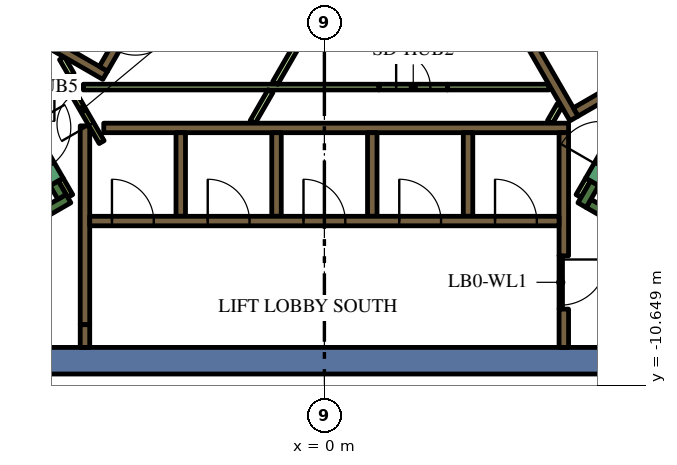
"""IFC4 building model, lengths in metres.
Left out: names, types, materials, properties, quantities, classifications, styles, units other than length and angle.
Written with IfcOpenShell. Run it as: python <this file> out.ifc"""

import sys

from ifc_helpers import new_model, si_unit, direction, frame, frame_2d, origin, place, context, subcontext, project, spatial, polyline, rectangle, outline, extrude, element, fill, save


model = new_model("IFC4")
c1 = context("Model", 3, precision=1e-05, world=origin(), true_north=direction((0.0, 1.0)))
c2 = subcontext(c1, "Body", "Model", "MODEL_VIEW")
j1 = project(units=[si_unit("LENGTHUNIT", "METRE"), si_unit("PLANEANGLEUNIT", "RADIAN")], contexts=[c1])
p1 = place(None, origin())
s1 = spatial("IfcSite", under=j1, at=p1, CompositionType="ELEMENT")
p2 = place(p1, origin())
s2 = spatial("IfcBuilding", under=s1, at=p2, CompositionType="ELEMENT")
p3 = place(p2, frame((0.0, 0.0, 214.2)))
s3 = spatial("IfcBuildingStorey", under=s2, at=p3, CompositionType="ELEMENT", Elevation=214.2)
p4 = place(p3, frame((-10.556, -10.0, 0.0), z_axis=(0.0, 0.0, 1.0), x_axis=(1.0, 0.0, 0.0)))
e1 = element("IfcWall", 1, at=p4, inside=s3, PredefinedType="SOLIDWALL", context=c2, shape_type="SweptSolid", body=[
    extrude(rectangle(XDim=19.461, YDim=0.7, at=frame_2d((9.73, 0.0))), origin(), (0.0, 0.0, 1.0), 4.2),
])
p5 = place(p3, frame((12.84, -9.261, 0.0), z_axis=(0.0, 0.0, 1.0), x_axis=(-0.866013990052, 0.500019768644, 0.0)))
e2 = element("IfcWall", 2, at=p5, inside=s3, PredefinedType="SOLIDWALL", context=c2, shape_type="SweptSolid", body=[
    extrude(rectangle(XDim=6.8, YDim=0.25, at=frame_2d((3.4, 0.0))), origin(), (0.0, 0.0, 1.0), 4.2),
])
p6 = place(p3, frame((7.113, -5.33, 0.0), z_axis=(0.0, 0.0, 1.0), x_axis=(-0.499965889992, -0.866045096311, 0.0)))
e3 = element("IfcWall", 3, at=p6, inside=s3, PredefinedType="SOLIDWALL", context=c2, shape_type="SweptSolid", body=[
    extrude(rectangle(XDim=0.666, YDim=0.25, at=frame_2d((0.333, 0.0))), origin(), (0.0, 0.0, 1.0), 4.2),
])
p7 = place(p3, frame((-12.84, -9.261, 0.0), z_axis=(0.0, 0.0, 1.0), x_axis=(0.866016039709, 0.500016218704, 0.0)))
e4 = element("IfcWall", 4, at=p7, inside=s3, PredefinedType="SOLIDWALL", context=c2, shape_type="SweptSolid", body=[
    extrude(rectangle(XDim=7.05, YDim=0.25, at=frame_2d((3.525, 0.0))), origin(), (0.0, 0.0, 1.0), 4.2),
])
p8 = place(p3, frame((-6.905, -5.69, 0.0), z_axis=(0.0, 0.0, 1.0), x_axis=(-0.499993700073, 0.866029041019, 0.0)))
e5 = element("IfcWall", 5, at=p8, inside=s3, PredefinedType="SOLIDWALL", context=c2, shape_type="SweptSolid", body=[
    extrude(rectangle(XDim=0.416, YDim=0.25, at=frame_2d((0.208, 0.0))), origin(), (0.0, 0.0, 1.0), 4.2),
])
p9 = place(p3, frame((-6.3, -9.05, 0.0), z_axis=(0.0, 0.0, 1.0), x_axis=(0.0, 1.0, 0.0)))
e6 = element("IfcWall", 6, at=p9, inside=s3, PredefinedType="SOLIDWALL", context=c2, shape_type="SweptSolid", body=[
    extrude(rectangle(XDim=5.23, YDim=0.25, at=frame_2d((2.615, 0.0))), origin(), (0.0, 0.0, 1.0), 4.2),
])
p10 = place(p3, frame((-6.3, -9.052, 0.0), z_axis=(0.0, 0.0, 1.0), x_axis=(0.0, -1.0, 0.0)))
e7 = element("IfcWall", 7, at=p10, inside=s3, PredefinedType="SOLIDWALL", context=c2, shape_type="SweptSolid", body=[
    extrude(rectangle(XDim=0.598, YDim=0.25, at=frame_2d((0.299, 0.0))), origin(), (0.0, 0.0, 1.0), 4.2),
])
p11 = place(p3, frame((-5.806, -3.875, 0.0), z_axis=(0.0, 0.0, 1.0), x_axis=(1.0, 0.0, 0.0)))
e8 = element("IfcWall", 8, at=p11, inside=s3, PredefinedType="SOLIDWALL", context=c2, shape_type="SweptSolid", body=[
    extrude(rectangle(XDim=12.231, YDim=0.25, at=frame_2d((6.116, 0.0))), origin(), (0.0, 0.0, 1.0), 4.2),
])
p12 = place(p3, frame((6.3, -7.24, 0.0), z_axis=(0.0, 0.0, 1.0), x_axis=(0.0, 1.0, 0.0)))
e9 = element("IfcWall", 9, at=p12, inside=s3, PredefinedType="SOLIDWALL", context=c2, shape_type="SweptSolid", body=[
    extrude(rectangle(XDim=3.24, YDim=0.25, at=frame_2d((1.62, 0.0))), origin(), (0.0, 0.0, 1.0), 4.2),
])
p13 = place(p3, frame((6.3, -9.65, 0.0), z_axis=(0.0, 0.0, 1.0), x_axis=(0.0, 1.0, 0.0)))
e10 = element("IfcWall", 10, at=p13, inside=s3, PredefinedType="SOLIDWALL", context=c2, shape_type="SweptSolid", body=[
    extrude(rectangle(XDim=1.008, YDim=0.25, at=frame_2d((0.504, 0.0))), origin(), (0.0, 0.0, 1.0), 4.2),
])
for number, where, z_axis, x_axis in (
    (11, (3.78, -4.0, 0.0), (0.0, 0.0, 1.0), (0.0, -1.0, 0.0)),
    (12, (1.26, -4.0, 0.0), (0.0, 0.0, 1.0), (0.0, -1.0, 0.0)),
    (13, (-1.26, -4.0, 0.0), (0.0, 0.0, 1.0), (0.0, -1.0, 0.0)),
    (14, (-3.78, -4.0, 0.0), (0.0, 0.0, 1.0), (0.0, -1.0, 0.0)),
):
    element("IfcWall", number, at=place(p3, frame(where, z_axis=z_axis, x_axis=x_axis)), inside=s3, PredefinedType="SOLIDWALL", context=c2, shape_type="SweptSolid", body=[
        extrude(rectangle(XDim=2.2, YDim=0.25, at=frame_2d((1.1, 0.0))), origin(), (0.0, 0.0, 1.0), 4.2),
    ])
p14 = place(p3, origin())
e15 = element("IfcWall", 15, at=p14, inside=s3, PredefinedType="SOLIDWALL", context=c2, shape_type="SweptSolid", body=[
    extrude(outline(polyline([(0.332, 6.925), (0.335, 6.925), (0.335, 6.925), (0.335, 6.925), (0.335, 7.075), (0.335, 7.075), (0.335, 7.075), (0.245, 7.075), (0.035, 7.439), (0.252, 7.564), (0.377, 7.348), (1.512, 5.382), (1.637, 5.165), (2.221, 4.153), (2.771, 3.199), (2.896, 2.983), (3.138, 2.564), (4.031, 1.017), (4.156, 0.801), (5.292, -1.165), (5.417, -1.382), (6.073, -2.519), (6.552, -3.348), (6.677, -3.564), (6.46, -3.689), (0.332, 6.925)])), origin(), (0.0, 0.0, 1.0), 4.2),
])
p15 = place(p3, frame((11.507, -0.631, 0.0), z_axis=(0.0, 0.0, 1.0), x_axis=(-0.866011447264, -0.500024172624, 0.0)))
e16 = element("IfcWall", 16, at=p15, inside=s3, PredefinedType="SOLIDWALL", context=c2, shape_type="SweptSolid", body=[
    extrude(rectangle(XDim=5.65, YDim=0.25, at=frame_2d((2.825, 0.0))), origin(), (0.0, 0.0, 1.0), 4.2),
])
p16 = place(p3, frame((-7.889, -1.265, 0.0), z_axis=(0.0, 0.0, 1.0), x_axis=(0.866057815567, -0.499943856944, 0.0)))
e17 = element("IfcWall", 17, at=p16, inside=s3, PredefinedType="SOLIDWALL", context=c2, shape_type="SweptSolid", body=[
    extrude(rectangle(XDim=2.45, YDim=0.25, at=frame_2d((1.225, 0.0))), origin(), (0.0, 0.0, 1.0), 4.2),
])
p17 = place(p3, frame((1.438, -2.8, 0.0), z_axis=(0.0, 0.0, 1.0), x_axis=(-1.0, 0.0, 0.0)))
e18 = element("IfcWall", 18, at=p17, inside=s3, PredefinedType="PARTITIONING", context=c2, shape_type="SweptSolid", body=[
    extrude(rectangle(XDim=7.781, YDim=0.15, at=frame_2d((3.891, 0.0))), origin(), (0.0, 0.0, 1.0), 3.45),
])
p18 = place(p3, frame((-1.418, -2.907, 0.0), z_axis=(0.0, 0.0, 1.0), x_axis=(-0.499978056798, -0.866038072327, 0.0)))
e19 = element("IfcWall", 19, at=p18, inside=s3, PredefinedType="PARTITIONING", context=c2, shape_type="SweptSolid", body=[
    extrude(rectangle(XDim=0.937, YDim=0.15, at=frame_2d((0.469, 0.0))), origin(), (0.0, 0.0, 1.0), 3.45),
])
for number, where, z_axis, x_axis in (
    (20, (-1.295, -2.693, 0.0), (0.0, 0.0, 1.0), (0.5, 0.866, 0.0)),
    (21, (3.238, -2.8, 0.0), (0.0, 0.0, 1.0), (1.0, 0.0, 0.0)),
):
    element("IfcWall", number, at=place(p3, frame(where, z_axis=z_axis, x_axis=x_axis)), inside=s3, PredefinedType="PARTITIONING", context=c2, shape_type="SweptSolid", body=[
        extrude(rectangle(XDim=2.672, YDim=0.15, at=frame_2d((1.336, 0.0))), origin(), (0.0, 0.0, 1.0), 3.45),
    ])
p19 = place(p3, frame((-6.653, -2.477, 0.0), z_axis=(0.0, 0.0, 1.0), x_axis=(-0.500002592159, 0.866023907196, 0.0)))
e22 = element("IfcWall", 22, at=p19, inside=s3, PredefinedType="PARTITIONING", context=c2, shape_type="SweptSolid", body=[
    extrude(rectangle(XDim=0.503, YDim=0.15, at=frame_2d((0.251, 0.0))), origin(), (0.0, 0.0, 1.0), 3.45),
])
p20 = place(p3, frame((-6.94, -5.23, 0.0), z_axis=(0.0, 0.0, 1.0), x_axis=(0.499834152157, -0.86612113491, 0.0)))
e23 = element("IfcWall", 23, at=p20, inside=s3, PredefinedType="PARTITIONING", context=c2, shape_type="SweptSolid", body=[
    extrude(rectangle(XDim=0.505, YDim=0.15, at=frame_2d((0.252, 0.0))), origin(), (0.0, 0.0, 1.0), 4.2),
])
p21 = place(p3, frame((6.688, -5.667, 0.0), z_axis=(0.0, 0.0, 1.0), x_axis=(0.499834152157, 0.86612113491, 0.0)))
e24 = element("IfcWall", 24, at=p21, inside=s3, PredefinedType="PARTITIONING", context=c2, shape_type="SweptSolid", body=[
    extrude(rectangle(XDim=0.505, YDim=0.15, at=frame_2d((0.252, 0.0))), origin(), (0.0, 0.0, 1.0), 3.45),
])
p22 = place(p3, frame((5.936, -3.718, 0.0), z_axis=(0.0, 0.0, 1.0), x_axis=(0.499890179513, 0.866088799389, 0.0)))
e25 = element("IfcWall", 25, at=p22, inside=s3, PredefinedType="PARTITIONING", context=c2, shape_type="SweptSolid", body=[
    extrude(rectangle(XDim=0.504, YDim=0.15, at=frame_2d((0.252, 0.0))), origin(), (0.0, 0.0, 1.0), 3.45),
])
p23 = place(p3, frame((-6.175, -6.325, 0.0), z_axis=(0.0, 0.0, 1.0), x_axis=(1.0, 0.0, 0.0)))
e26 = element("IfcWall", 26, at=p23, inside=s3, PredefinedType="SOLIDWALL", context=c2, shape_type="SweptSolid", body=[
    extrude(rectangle(XDim=12.35, YDim=0.25, at=frame_2d((6.175, 0.0))), origin(), (0.0, 0.0, 1.0), 4.2),
])
p24 = place(p23, frame((0.585, 0.0, 0.0)))
e27 = element("IfcOpeningElement", 27, at=p24, cuts=e26, PredefinedType="OPENING", context=c2, shape_type="SweptSolid", body=[
    extrude(rectangle(XDim=1.1, YDim=2.1, at=frame_2d((0.55, 1.05))), frame((0.0, 0.135, 0.0), z_axis=(0.0, -1.0, 0.0), x_axis=(1.0, 0.0, 0.0)), (0.0, 0.0, 1.0), 0.27),
])
p25 = place(p23, frame((3.105, 0.0, 0.0)))
e28 = element("IfcOpeningElement", 28, at=p25, cuts=e26, PredefinedType="OPENING", context=c2, shape_type="SweptSolid", body=[
    extrude(rectangle(XDim=1.1, YDim=2.1, at=frame_2d((0.55, 1.05))), frame((0.0, 0.135, 0.0), z_axis=(0.0, -1.0, 0.0), x_axis=(1.0, 0.0, 0.0)), (0.0, 0.0, 1.0), 0.27),
])
p26 = place(p23, frame((5.625, 0.0, 0.0)))
e29 = element("IfcOpeningElement", 29, at=p26, cuts=e26, PredefinedType="OPENING", context=c2, shape_type="SweptSolid", body=[
    extrude(rectangle(XDim=1.1, YDim=2.1, at=frame_2d((0.55, 1.05))), frame((0.0, 0.135, 0.0), z_axis=(0.0, -1.0, 0.0), x_axis=(1.0, 0.0, 0.0)), (0.0, 0.0, 1.0), 0.27),
])
p27 = place(p23, frame((8.145, 0.0, 0.0)))
e30 = element("IfcOpeningElement", 30, at=p27, cuts=e26, PredefinedType="OPENING", context=c2, shape_type="SweptSolid", body=[
    extrude(rectangle(XDim=1.1, YDim=2.1, at=frame_2d((0.55, 1.05))), frame((0.0, 0.135, 0.0), z_axis=(0.0, -1.0, 0.0), x_axis=(1.0, 0.0, 0.0)), (0.0, 0.0, 1.0), 0.27),
])
p28 = place(p23, frame((10.665, 0.0, 0.0)))
e31 = element("IfcOpeningElement", 31, at=p28, cuts=e26, PredefinedType="OPENING", context=c2, shape_type="SweptSolid", body=[
    extrude(rectangle(XDim=1.1, YDim=2.1, at=frame_2d((0.55, 1.05))), frame((0.0, 0.135, 0.0), z_axis=(0.0, -1.0, 0.0), x_axis=(1.0, 0.0, 0.0)), (0.0, 0.0, 1.0), 0.27),
])
p29 = place(p3, frame((8.565, -2.185, 0.0), z_axis=(0.0, 0.0, 1.0), x_axis=(-0.499997954832, 0.866026584559, 0.0)))
e32 = element("IfcWall", 32, at=p29, inside=s3, PredefinedType="SOLIDWALL", context=c2, shape_type="SweptSolid", body=[
    extrude(rectangle(XDim=12.35, YDim=0.25, at=frame_2d((6.175, 0.0))), origin(), (0.0, 0.0, 1.0), 4.2),
])
p30 = place(p29, frame((0.585, 0.0, 0.0)))
e33 = element("IfcOpeningElement", 33, at=p30, cuts=e32, PredefinedType="OPENING", context=c2, shape_type="SweptSolid", body=[
    extrude(rectangle(XDim=1.1, YDim=2.1, at=frame_2d((0.55, 1.05))), frame((0.0, 0.135, 0.0), z_axis=(0.0, -1.0, 0.0), x_axis=(1.0, 0.0, 0.0)), (0.0, 0.0, 1.0), 0.27),
])
p31 = place(p3, frame((-0.898, 6.194, 0.0), z_axis=(0.0, 0.0, 1.0), x_axis=(-0.499996202215, -0.866027596426, 0.0)))
e34 = element("IfcWall", 34, at=p31, inside=s3, PredefinedType="SOLIDWALL", context=c2, shape_type="SweptSolid", body=[
    extrude(rectangle(XDim=9.83, YDim=0.25, at=frame_2d((4.915, 0.0))), origin(), (0.0, 0.0, 1.0), 4.2),
])
p32 = place(p31, frame((0.585, 0.0, 0.0)))
e35 = element("IfcOpeningElement", 35, at=p32, cuts=e34, PredefinedType="OPENING", context=c2, shape_type="SweptSolid", body=[
    extrude(rectangle(XDim=1.1, YDim=2.1, at=frame_2d((0.55, 1.05))), frame((0.0, 0.135, 0.0), z_axis=(0.0, -1.0, 0.0), x_axis=(1.0, 0.0, 0.0)), (0.0, 0.0, 1.0), 0.27),
])
p33 = place(p31, frame((3.105, 0.0, 0.0)))
e36 = element("IfcOpeningElement", 36, at=p33, cuts=e34, PredefinedType="OPENING", context=c2, shape_type="SweptSolid", body=[
    extrude(rectangle(XDim=1.1, YDim=2.1, at=frame_2d((0.55, 1.05))), frame((0.0, 0.135, 0.0), z_axis=(0.0, -1.0, 0.0), x_axis=(1.0, 0.0, 0.0)), (0.0, 0.0, 1.0), 0.27),
])
p34 = place(p31, frame((5.625, 0.0, 0.0)))
e37 = element("IfcOpeningElement", 37, at=p34, cuts=e34, PredefinedType="OPENING", context=c2, shape_type="SweptSolid", body=[
    extrude(rectangle(XDim=1.1, YDim=2.1, at=frame_2d((0.55, 1.05))), frame((0.0, 0.135, 0.0), z_axis=(0.0, -1.0, 0.0), x_axis=(1.0, 0.0, 0.0)), (0.0, 0.0, 1.0), 0.27),
])
p35 = place(p31, frame((8.145, 0.0, 0.0)))
e38 = element("IfcOpeningElement", 38, at=p35, cuts=e34, PredefinedType="OPENING", context=c2, shape_type="SweptSolid", body=[
    extrude(rectangle(XDim=1.1, YDim=2.1, at=frame_2d((0.55, 1.05))), frame((0.0, 0.135, 0.0), z_axis=(0.0, -1.0, 0.0), x_axis=(1.0, 0.0, 0.0)), (0.0, 0.0, 1.0), 0.27),
])
p36 = place(p3, frame((7.048, -5.292, 0.0), z_axis=(0.0, 0.0, 1.0), x_axis=(0.49994051562, 0.866059744384, 0.0)))
e39 = element("IfcWall", 39, at=p36, inside=s3, PredefinedType="SOLIDWALL", context=c2, shape_type="SweptSolid", body=[
    extrude(rectangle(XDim=2.1, YDim=0.4, at=frame_2d((1.05, 0.0))), origin(), (0.0, 0.0, 1.0), 4.2),
])
p37 = place(p36, frame((0.45, 0.0, 0.0)))
e40 = element("IfcOpeningElement", 40, at=p37, cuts=e39, PredefinedType="OPENING", context=c2, shape_type="SweptSolid", body=[
    extrude(rectangle(XDim=1.2, YDim=2.1, at=frame_2d((0.6, 1.05))), frame((0.0, 0.21, 0.0), z_axis=(0.0, -1.0, 0.0), x_axis=(1.0, 0.0, 0.0)), (0.0, 0.0, 1.0), 0.42),
])
p38 = place(p3, frame((-8.098, -3.474, 0.0), z_axis=(0.0, 0.0, 1.0), x_axis=(0.49994051562, -0.866059744384, 0.0)))
e41 = element("IfcWall", 41, at=p38, inside=s3, PredefinedType="SOLIDWALL", context=c2, shape_type="SweptSolid", body=[
    extrude(rectangle(XDim=2.1, YDim=0.4, at=frame_2d((1.05, 0.0))), origin(), (0.0, 0.0, 1.0), 4.2),
])
p39 = place(p38, frame((0.45, 0.0, 0.0)))
e42 = element("IfcOpeningElement", 42, at=p39, cuts=e41, PredefinedType="OPENING", context=c2, shape_type="SweptSolid", body=[
    extrude(rectangle(XDim=1.2, YDim=2.1, at=frame_2d((0.6, 1.05))), frame((0.0, 0.21, 0.0), z_axis=(0.0, -1.0, 0.0), x_axis=(1.0, 0.0, 0.0)), (0.0, 0.0, 1.0), 0.42),
])
p40 = place(p3, frame((-5.861, -4.248, 0.0), z_axis=(0.0, 0.0, 1.0), x_axis=(-0.500043646338, 0.866000203093, 0.0)))
e43 = element("IfcWall", 43, at=p40, inside=s3, PredefinedType="PARTITIONING", context=c2, shape_type="SweptSolid", body=[
    extrude(rectangle(XDim=1.93, YDim=0.15, at=frame_2d((0.965, 0.0))), origin(), (0.0, 0.0, 1.0), 4.2),
])
p41 = place(p40, frame((0.55, 0.0, 0.0)))
e44 = element("IfcOpeningElement", 44, at=p41, cuts=e43, PredefinedType="OPENING", context=c2, shape_type="SweptSolid", body=[
    extrude(rectangle(XDim=0.9, YDim=2.1, at=frame_2d((0.45, 1.05))), frame((0.0, 0.085, 0.0), z_axis=(0.0, -1.0, 0.0), x_axis=(1.0, 0.0, 0.0)), (0.0, 0.0, 1.0), 0.17),
])
p42 = place(p3, frame((6.22, -7.237, 0.0), z_axis=(0.0, 0.0, 1.0), x_axis=(0.0, -1.0, 0.0)))
e45 = element("IfcWall", 45, at=p42, inside=s3, PredefinedType="PARTITIONING", context=c2, shape_type="SweptSolid", body=[
    extrude(rectangle(XDim=1.4, YDim=0.09, at=frame_2d((0.7, 0.0))), origin(), (0.0, 0.0, 1.0), 3.45),
])
p43 = place(p42, frame((0.1, 0.0, 0.0)))
e46 = element("IfcOpeningElement", 46, at=p43, cuts=e45, PredefinedType="OPENING", context=c2, shape_type="SweptSolid", body=[
    extrude(rectangle(XDim=1.2, YDim=2.1, at=frame_2d((0.6, 1.05))), frame((0.0, 0.055, 0.0), z_axis=(0.0, -1.0, 0.0), x_axis=(1.0, 0.0, 0.0)), (0.0, 0.0, 1.0), 0.11),
])
p44 = place(p3, frame((1.438, -2.8, 0.0), z_axis=(0.0, 0.0, 1.0), x_axis=(1.0, 0.0, 0.0)))
e47 = element("IfcWall", 47, at=p44, inside=s3, PredefinedType="PARTITIONING", context=c2, shape_type="SweptSolid", body=[
    extrude(rectangle(XDim=1.8, YDim=0.15, at=frame_2d((0.9, 0.0))), origin(), (0.0, 0.0, 1.0), 3.45),
])
p45 = place(p44, frame((0.45, 0.0, 0.0)))
e48 = element("IfcOpeningElement", 48, at=p45, cuts=e47, PredefinedType="OPENING", context=c2, shape_type="SweptSolid", body=[
    extrude(rectangle(XDim=0.9, YDim=2.1, at=frame_2d((0.45, 1.05))), frame((0.0, 0.085, 0.0), z_axis=(0.0, -1.0, 0.0), x_axis=(1.0, 0.0, 0.0)), (0.0, 0.0, 1.0), 0.17),
])
p46 = place(p3, frame((-6.655, -2.8, 0.0), z_axis=(0.0, 0.0, 1.0), x_axis=(-1.0, 0.0, 0.0)))
e49 = element("IfcWall", 49, at=p46, inside=s3, PredefinedType="PARTITIONING", context=c2, shape_type="SweptSolid", body=[
    extrude(rectangle(XDim=1.8, YDim=0.15, at=frame_2d((0.9, 0.0))), origin(), (0.0, 0.0, 1.0), 3.45),
])
p47 = place(p46, frame((0.45, 0.0, 0.0)))
e50 = element("IfcOpeningElement", 50, at=p47, cuts=e49, PredefinedType="OPENING", context=c2, shape_type="SweptSolid", body=[
    extrude(rectangle(XDim=0.9, YDim=2.1, at=frame_2d((0.45, 1.05))), frame((0.0, 0.085, 0.0), z_axis=(0.0, -1.0, 0.0), x_axis=(1.0, 0.0, 0.0)), (0.0, 0.0, 1.0), 0.17),
])
p48 = place(p24, origin())
e51 = element("IfcDoor", 51, at=p48, inside=s3, OperationType="DOUBLE_DOOR_SLIDING", PredefinedType="DOOR", context=c2, shape_type="SweptSolid", body=[
    extrude(rectangle(XDim=1.1, YDim=2.1, at=frame_2d((0.55, 1.05))), frame((0.0, 0.025, 0.0), z_axis=(0.0, -1.0, 0.0), x_axis=(1.0, 0.0, 0.0)), (0.0, 0.0, 1.0), 0.05),
])
fill(e27, e51)
p49 = place(p25, origin())
e52 = element("IfcDoor", 52, at=p49, inside=s3, OperationType="DOUBLE_DOOR_SLIDING", PredefinedType="DOOR", context=c2, shape_type="SweptSolid", body=[
    extrude(rectangle(XDim=1.1, YDim=2.1, at=frame_2d((0.55, 1.05))), frame((0.0, 0.025, 0.0), z_axis=(0.0, -1.0, 0.0), x_axis=(1.0, 0.0, 0.0)), (0.0, 0.0, 1.0), 0.05),
])
fill(e28, e52)
p50 = place(p26, origin())
e53 = element("IfcDoor", 53, at=p50, inside=s3, OperationType="DOUBLE_DOOR_SLIDING", PredefinedType="DOOR", context=c2, shape_type="SweptSolid", body=[
    extrude(rectangle(XDim=1.1, YDim=2.1, at=frame_2d((0.55, 1.05))), frame((0.0, 0.025, 0.0), z_axis=(0.0, -1.0, 0.0), x_axis=(1.0, 0.0, 0.0)), (0.0, 0.0, 1.0), 0.05),
])
fill(e29, e53)
p51 = place(p27, origin())
e54 = element("IfcDoor", 54, at=p51, inside=s3, OperationType="DOUBLE_DOOR_SLIDING", PredefinedType="DOOR", context=c2, shape_type="SweptSolid", body=[
    extrude(rectangle(XDim=1.1, YDim=2.1, at=frame_2d((0.55, 1.05))), frame((0.0, 0.025, 0.0), z_axis=(0.0, -1.0, 0.0), x_axis=(1.0, 0.0, 0.0)), (0.0, 0.0, 1.0), 0.05),
])
fill(e30, e54)
p52 = place(p28, origin())
e55 = element("IfcDoor", 55, at=p52, inside=s3, OperationType="DOUBLE_DOOR_SLIDING", PredefinedType="DOOR", context=c2, shape_type="SweptSolid", body=[
    extrude(rectangle(XDim=1.1, YDim=2.1, at=frame_2d((0.55, 1.05))), frame((0.0, 0.025, 0.0), z_axis=(0.0, -1.0, 0.0), x_axis=(1.0, 0.0, 0.0)), (0.0, 0.0, 1.0), 0.05),
])
fill(e31, e55)
p53 = place(p41, origin())
e56 = element("IfcDoor", 56, at=p53, inside=s3, OperationType="SINGLE_SWING_LEFT", PredefinedType="DOOR", context=c2, shape_type="SweptSolid", body=[
    extrude(rectangle(XDim=0.9, YDim=2.1, at=frame_2d((0.45, 1.05))), frame((0.0, 0.025, 0.0), z_axis=(0.0, -1.0, 0.0), x_axis=(1.0, 0.0, 0.0)), (0.0, 0.0, 1.0), 0.05),
])
fill(e44, e56)
p54 = place(p43, origin())
e57 = element("IfcDoor", 57, at=p54, inside=s3, OperationType="SINGLE_SWING_LEFT", PredefinedType="DOOR", context=c2, shape_type="SweptSolid", body=[
    extrude(rectangle(XDim=1.2, YDim=2.1, at=frame_2d((0.6, 1.05))), frame((0.0, 0.025, 0.0), z_axis=(0.0, -1.0, 0.0), x_axis=(1.0, 0.0, 0.0)), (0.0, 0.0, 1.0), 0.05),
])
fill(e46, e57)
p55 = place(p45, origin())
e58 = element("IfcDoor", 58, at=p55, inside=s3, OperationType="SINGLE_SWING_LEFT", PredefinedType="DOOR", context=c2, shape_type="SweptSolid", body=[
    extrude(rectangle(XDim=0.9, YDim=2.1, at=frame_2d((0.45, 1.05))), frame((0.0, 0.025, 0.0), z_axis=(0.0, -1.0, 0.0), x_axis=(1.0, 0.0, 0.0)), (0.0, 0.0, 1.0), 0.05),
])
fill(e48, e58)
p56 = place(p47, origin())
e59 = element("IfcDoor", 59, at=p56, inside=s3, OperationType="SINGLE_SWING_LEFT", PredefinedType="DOOR", context=c2, shape_type="SweptSolid", body=[
    extrude(rectangle(XDim=0.9, YDim=2.1, at=frame_2d((0.45, 1.05))), frame((0.0, 0.025, 0.0), z_axis=(0.0, -1.0, 0.0), x_axis=(1.0, 0.0, 0.0)), (0.0, 0.0, 1.0), 0.05),
])
fill(e50, e59)
save(model, sys.argv[1])
